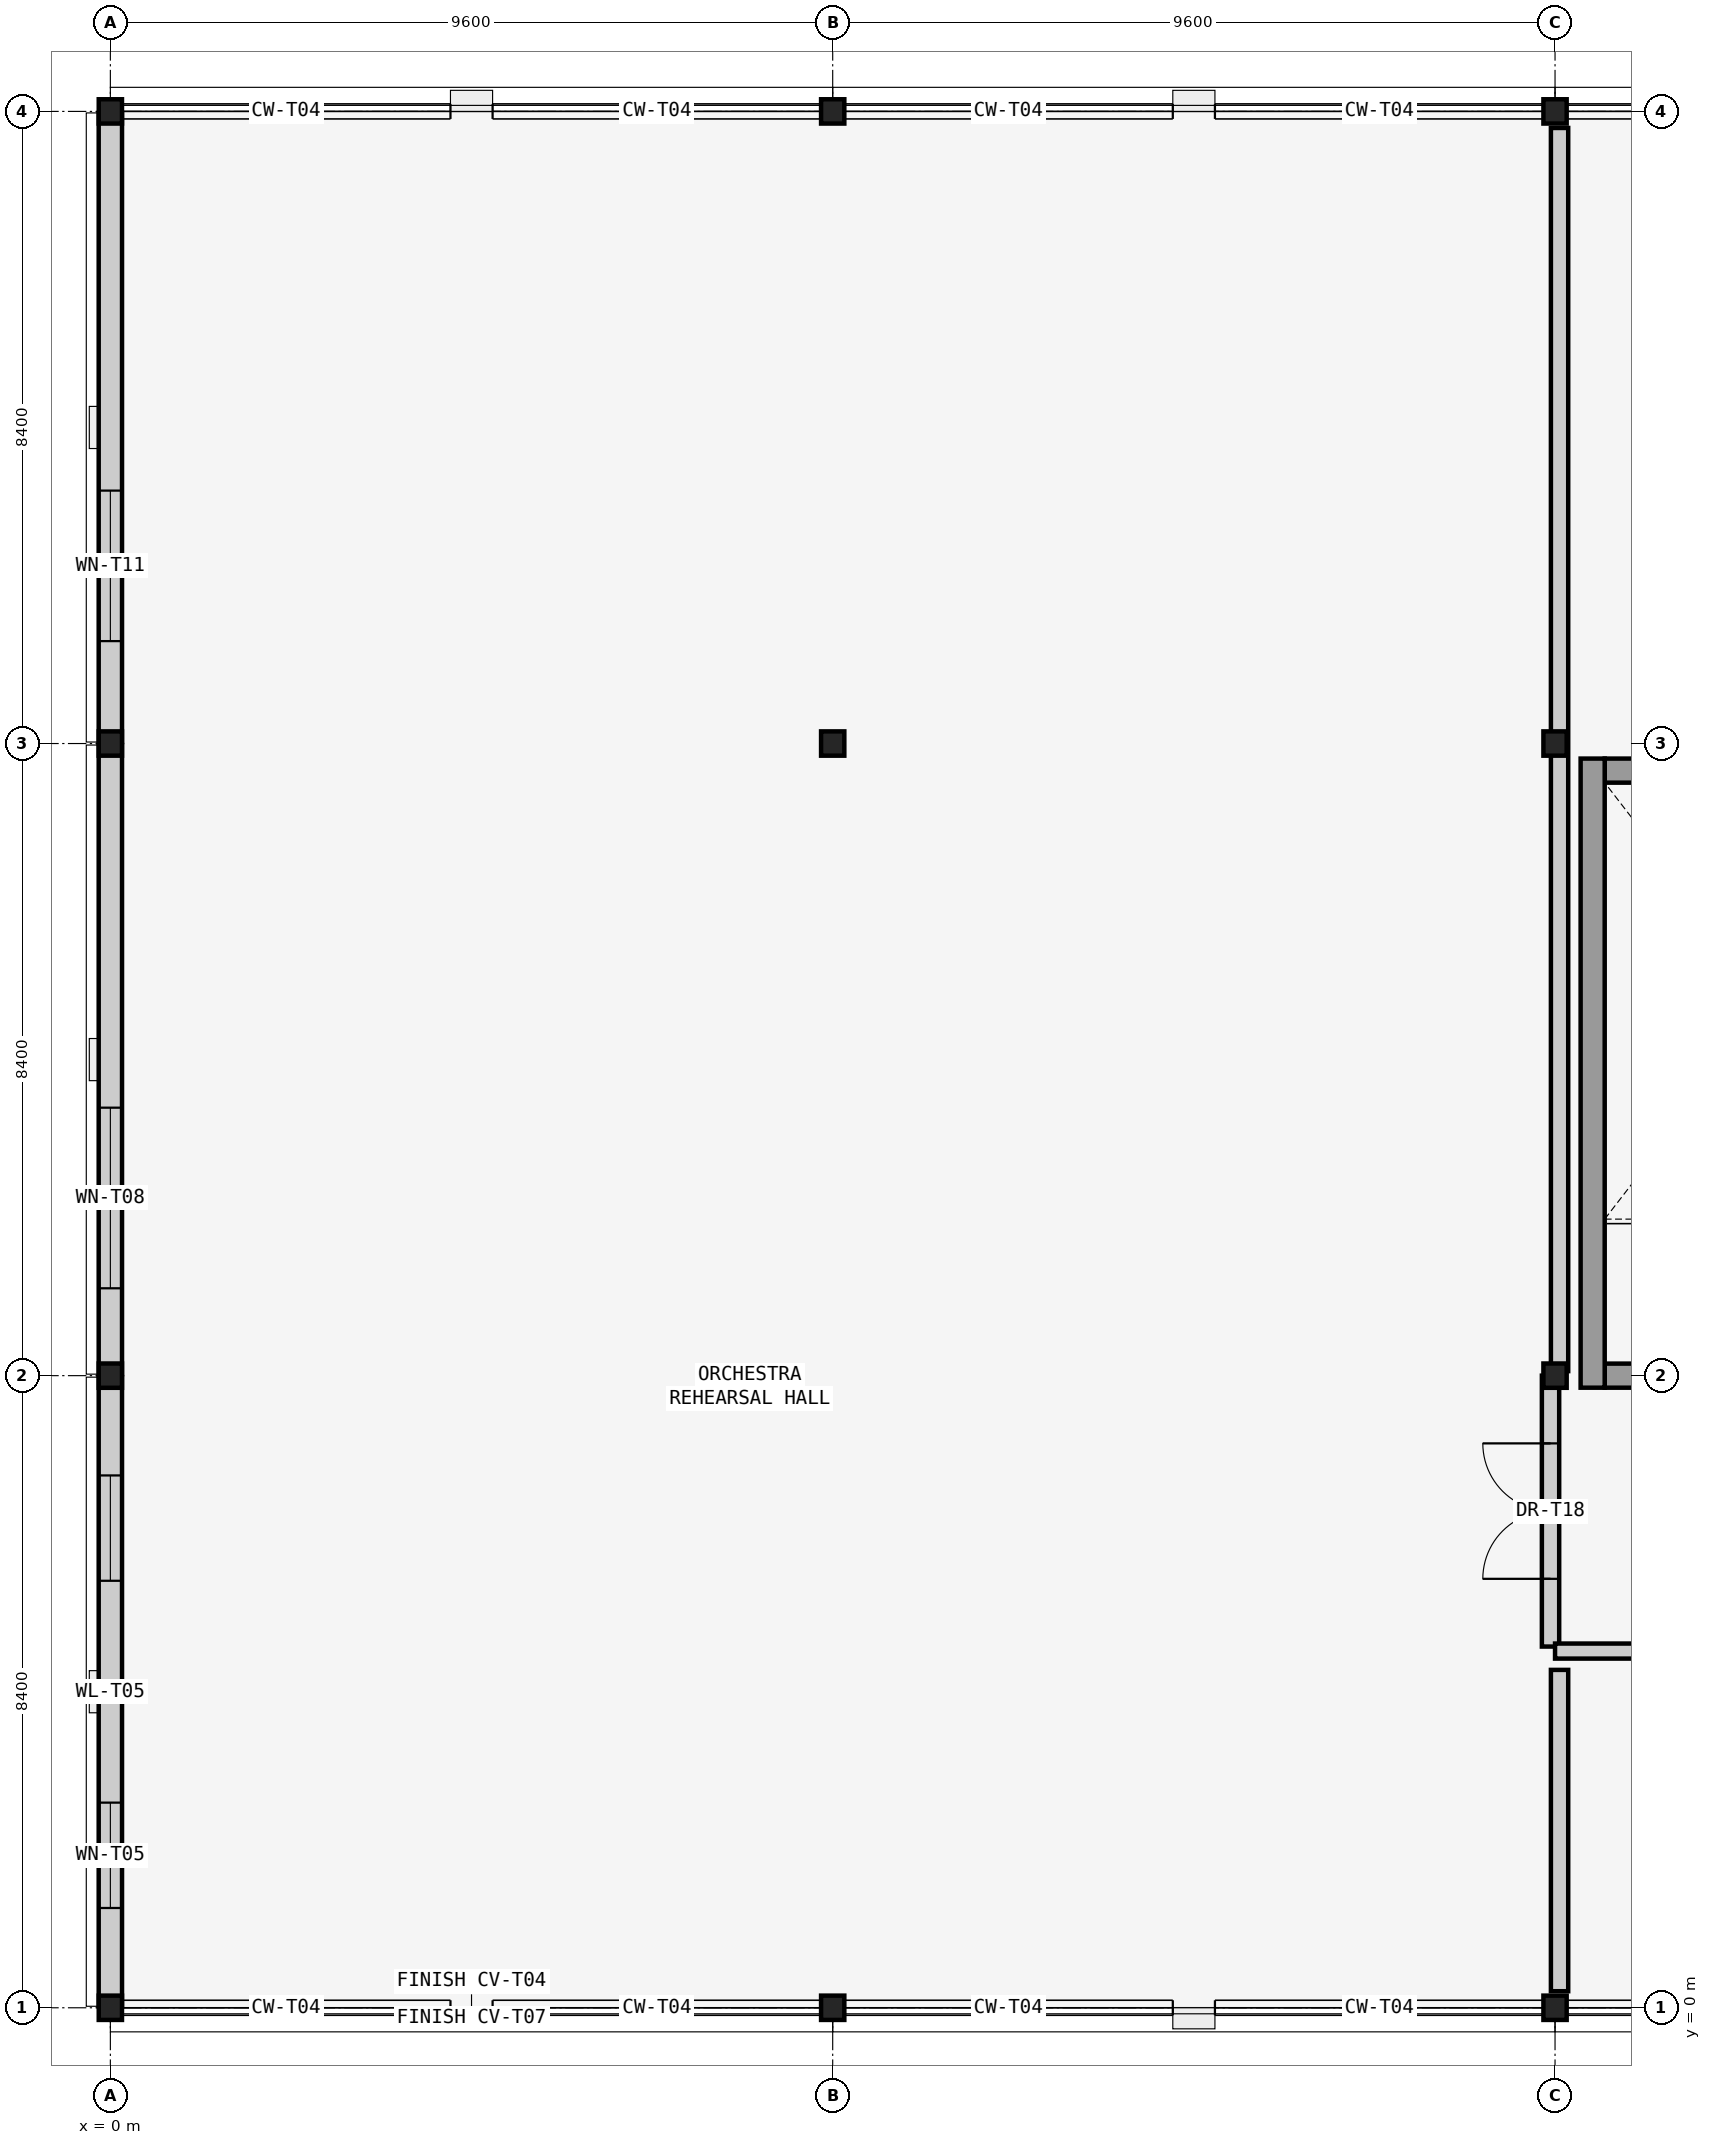
"""IFC4 building model, lengths in metres.
Left out: names, types, materials, properties, quantities, classifications, styles, units other than length and angle.
Written with IfcOpenShell. Run it as: python <this file> out.ifc"""

import sys

from ifc_helpers import new_model, si_unit, direction, frame, frame_2d, origin, origin_2d, place, context, subcontext, project, spatial, rectangle, i_section, extrude, element, fill, save


model = new_model("IFC4")
c1 = context("Model", 3, precision=1e-05, world=origin(), true_north=direction((0.0, 1.0)))
c2 = subcontext(c1, "Body", "Model", "MODEL_VIEW")
j1 = project(units=[si_unit("LENGTHUNIT", "METRE"), si_unit("PLANEANGLEUNIT", "RADIAN")], contexts=[c1])
p1 = place(None, origin())
s1 = spatial("IfcSite", under=j1, at=p1, CompositionType="ELEMENT")
p2 = place(p1, origin())
s2 = spatial("IfcBuilding", under=s1, at=p2, CompositionType="ELEMENT")
p3 = place(p2, frame((0.0, 0.0, 10.2)))
s3 = spatial("IfcBuildingStorey", under=s2, at=p3, CompositionType="ELEMENT", Elevation=10.2)
for number, where, z_axis, x_axis in (
    (1, (0.0, 0.0, 0.0), (0.0, 0.0, 1.0), (1.0, 0.0, 0.0)),
    (2, (0.0, 8.4, 0.0), (0.0, 0.0, 1.0), (1.0, 0.0, 0.0)),
):
    element("IfcColumn", number, at=place(p3, frame(where, z_axis=z_axis, x_axis=x_axis)), inside=s3, PredefinedType="COLUMN", context=c2, shape_type="SweptSolid", body=[
        extrude(i_section(OverallWidth=0.309, OverallDepth=0.323, WebThickness=0.014, FlangeThickness=0.023, at=origin_2d()), origin(), (0.0, 0.0, 1.0), 4.62),
    ])
for number, where, z_axis, x_axis in (
    (3, (0.0, 16.8, 0.0), (0.0, 0.0, 1.0), (1.0, 0.0, 0.0)),
    (4, (0.0, 25.2, 0.0), (0.0, 0.0, 1.0), (1.0, 0.0, 0.0)),
):
    element("IfcColumn", number, at=place(p3, frame(where, z_axis=z_axis, x_axis=x_axis)), inside=s3, PredefinedType="COLUMN", context=c2, shape_type="SweptSolid", body=[
        extrude(i_section(OverallWidth=0.309, OverallDepth=0.323, WebThickness=0.014, FlangeThickness=0.023, at=origin_2d()), origin(), (0.0, 0.0, 1.0), 4.53),
    ])
p4 = place(p3, frame((9.6, 0.0, 0.0), z_axis=(0.0, 0.0, 1.0), x_axis=(1.0, 0.0, 0.0)))
e5 = element("IfcColumn", 5, at=p4, inside=s3, PredefinedType="COLUMN", context=c2, shape_type="SweptSolid", body=[
    extrude(i_section(OverallWidth=0.309, OverallDepth=0.323, WebThickness=0.014, FlangeThickness=0.023, at=origin_2d()), origin(), (0.0, 0.0, 1.0), 4.62),
])
for number, where, z_axis, x_axis in (
    (6, (9.6, 16.8, 0.0), (0.0, 0.0, 1.0), (1.0, 0.0, 0.0)),
    (7, (9.6, 25.2, 0.0), (0.0, 0.0, 1.0), (1.0, 0.0, 0.0)),
):
    element("IfcColumn", number, at=place(p3, frame(where, z_axis=z_axis, x_axis=x_axis)), inside=s3, PredefinedType="COLUMN", context=c2, shape_type="SweptSolid", body=[
        extrude(i_section(OverallWidth=0.309, OverallDepth=0.323, WebThickness=0.014, FlangeThickness=0.023, at=origin_2d()), origin(), (0.0, 0.0, 1.0), 4.53),
    ])
for number, where, z_axis, x_axis in (
    (8, (19.2, 0.0, 0.0), (0.0, 0.0, 1.0), (1.0, 0.0, 0.0)),
    (9, (19.2, 8.4, 0.0), (0.0, 0.0, 1.0), (1.0, 0.0, 0.0)),
):
    element("IfcColumn", number, at=place(p3, frame(where, z_axis=z_axis, x_axis=x_axis)), inside=s3, PredefinedType="COLUMN", context=c2, shape_type="SweptSolid", body=[
        extrude(i_section(OverallWidth=0.309, OverallDepth=0.323, WebThickness=0.014, FlangeThickness=0.023, at=origin_2d()), origin(), (0.0, 0.0, 1.0), 4.62),
    ])
for number, where, z_axis, x_axis in (
    (10, (19.2, 16.8, 0.0), (0.0, 0.0, 1.0), (1.0, 0.0, 0.0)),
    (11, (19.2, 25.2, 0.0), (0.0, 0.0, 1.0), (1.0, 0.0, 0.0)),
):
    element("IfcColumn", number, at=place(p3, frame(where, z_axis=z_axis, x_axis=x_axis)), inside=s3, PredefinedType="COLUMN", context=c2, shape_type="SweptSolid", body=[
        extrude(i_section(OverallWidth=0.309, OverallDepth=0.323, WebThickness=0.014, FlangeThickness=0.023, at=origin_2d()), origin(), (0.0, 0.0, 1.0), 4.53),
    ])
p5 = place(p3, frame((0.0, 0.02, 0.0), z_axis=(0.0, 0.0, 1.0), x_axis=(0.0, 1.0, 0.0)))
e12 = element("IfcWall", 12, at=p5, inside=s3, PredefinedType="SOLIDWALL", context=c2, shape_type="SweptSolid", body=[
    extrude(rectangle(XDim=8.36, YDim=0.31, at=frame_2d((4.18, 0.0))), origin(), (0.0, 0.0, 1.0), 4.54),
])
p6 = place(p5, frame((1.306, 0.0, 1.05)))
e13 = element("IfcOpeningElement", 13, at=p6, cuts=e12, PredefinedType="OPENING", context=c2, shape_type="SweptSolid", body=[
    extrude(rectangle(XDim=1.4, YDim=1.8, at=frame_2d((0.7, 0.9))), frame((0.0, 0.165, 0.0), z_axis=(0.0, -1.0, 0.0), x_axis=(1.0, 0.0, 0.0)), (0.0, 0.0, 1.0), 0.33),
])
p7 = place(p5, frame((5.654, 0.0, 1.05)))
e14 = element("IfcOpeningElement", 14, at=p7, cuts=e12, PredefinedType="OPENING", context=c2, shape_type="SweptSolid", body=[
    extrude(rectangle(XDim=1.4, YDim=1.8, at=frame_2d((0.7, 0.9))), frame((0.0, 0.165, 0.0), z_axis=(0.0, -1.0, 0.0), x_axis=(1.0, 0.0, 0.0)), (0.0, 0.0, 1.0), 0.33),
])
p8 = place(p3, frame((0.0, 8.42, 0.0), z_axis=(0.0, 0.0, 1.0), x_axis=(0.0, 1.0, 0.0)))
e15 = element("IfcWall", 15, at=p8, inside=s3, PredefinedType="SOLIDWALL", context=c2, shape_type="SweptSolid", body=[
    extrude(rectangle(XDim=8.36, YDim=0.31, at=frame_2d((4.18, 0.0))), origin(), (0.0, 0.0, 1.0), 4.54),
])
p9 = place(p8, frame((1.141, 0.0, 0.95)))
e16 = element("IfcOpeningElement", 16, at=p9, cuts=e15, PredefinedType="OPENING", context=c2, shape_type="SweptSolid", body=[
    extrude(rectangle(XDim=2.4, YDim=2.2, at=frame_2d((1.2, 1.1))), frame((0.0, 0.165, 0.0), z_axis=(0.0, -1.0, 0.0), x_axis=(1.0, 0.0, 0.0)), (0.0, 0.0, 1.0), 0.33),
])
p10 = place(p3, frame((0.0, 16.82, 0.0), z_axis=(0.0, 0.0, 1.0), x_axis=(0.0, 1.0, 0.0)))
e17 = element("IfcWall", 17, at=p10, inside=s3, PredefinedType="SOLIDWALL", context=c2, shape_type="SweptSolid", body=[
    extrude(rectangle(XDim=8.36, YDim=0.31, at=frame_2d((4.18, 0.0))), origin(), (0.0, 0.0, 1.0), 4.178),
])
p11 = place(p10, frame((1.341, 0.0, 1.9)))
e18 = element("IfcOpeningElement", 18, at=p11, cuts=e17, PredefinedType="OPENING", context=c2, shape_type="SweptSolid", body=[
    extrude(rectangle(XDim=2.0, YDim=1.5, at=frame_2d((1.0, 0.75))), frame((0.0, 0.165, 0.0), z_axis=(0.0, -1.0, 0.0), x_axis=(1.0, 0.0, 0.0)), (0.0, 0.0, 1.0), 0.33),
])
p12 = place(p3, frame((19.86, 8.4, 0.0), z_axis=(0.0, 0.0, 1.0), x_axis=(1.0, 0.0, 0.0)))
e19 = element("IfcWall", 19, at=p12, inside=s3, PredefinedType="SHEAR", context=c2, shape_type="SweptSolid", body=[
    extrude(rectangle(XDim=4.78, YDim=0.32, at=frame_2d((2.39, 0.0))), origin(), (0.0, 0.0, 1.0), 4.54),
])
p13 = place(p12, frame((1.69, 0.0, 0.0)))
e20 = element("IfcOpeningElement", 20, at=p13, cuts=e19, PredefinedType="OPENING", context=c2, shape_type="SweptSolid", body=[
    extrude(rectangle(XDim=1.1, YDim=2.2, at=frame_2d((0.55, 1.1))), frame((0.0, 0.17, 0.0), z_axis=(0.0, -1.0, 0.0), x_axis=(1.0, 0.0, 0.0)), (0.0, 0.0, 1.0), 0.34),
])
p14 = place(p3, frame((28.14, 16.44, 0.0), z_axis=(0.0, 0.0, 1.0), x_axis=(-1.0, 0.0, 0.0)))
e21 = element("IfcWall", 21, at=p14, inside=s3, PredefinedType="SHEAR", context=c2, shape_type="SweptSolid", body=[
    extrude(rectangle(XDim=8.28, YDim=0.32, at=frame_2d((4.14, 0.0))), origin(), (0.0, 0.0, 1.0), 4.54),
])
p15 = place(p3, frame((19.7, 16.6, 0.0), z_axis=(0.0, 0.0, 1.0), x_axis=(0.0, -1.0, 0.0)))
e22 = element("IfcWall", 22, at=p15, inside=s3, PredefinedType="SHEAR", context=c2, shape_type="SweptSolid", body=[
    extrude(rectangle(XDim=8.36, YDim=0.32, at=frame_2d((4.18, 0.0))), origin(), (0.0, 0.0, 1.0), 4.54),
])
p16 = place(p3, frame((19.14, 4.8, 0.0), z_axis=(0.0, 0.0, 1.0), x_axis=(0.0, 1.0, 0.0)))
e23 = element("IfcWall", 23, at=p16, inside=s3, PredefinedType="SOLIDWALL", context=c2, shape_type="SweptSolid", body=[
    extrude(rectangle(XDim=3.6, YDim=0.23, at=frame_2d((1.8, 0.0))), origin(), (0.0, 0.0, 1.0), 4.3),
])
p17 = place(p16, frame((0.9, 0.0, 0.0)))
e24 = element("IfcOpeningElement", 24, at=p17, cuts=e23, PredefinedType="OPENING", context=c2, shape_type="SweptSolid", body=[
    extrude(rectangle(XDim=1.8, YDim=2.4, at=frame_2d((0.9, 1.2))), frame((0.0, 0.125, 0.0), z_axis=(0.0, -1.0, 0.0), x_axis=(1.0, 0.0, 0.0)), (0.0, 0.0, 1.0), 0.25),
])
p18 = place(p3, frame((19.2, 4.74, 0.0), z_axis=(0.0, 0.0, 1.0), x_axis=(1.0, 0.0, 0.0)))
e25 = element("IfcWall", 25, at=p18, inside=s3, PredefinedType="SOLIDWALL", context=c2, shape_type="SweptSolid", body=[
    extrude(rectangle(XDim=18.95, YDim=0.2, at=frame_2d((9.475, 0.0))), origin(), (0.0, 0.0, 1.0), 4.3),
])
p19 = place(p18, frame((9.0, 0.0, 0.0)))
e26 = element("IfcOpeningElement", 26, at=p19, cuts=e25, PredefinedType="OPENING", context=c2, shape_type="SweptSolid", body=[
    extrude(rectangle(XDim=0.95, YDim=2.15, at=frame_2d((0.475, 1.075))), frame((0.0, 0.11, 0.0), z_axis=(0.0, -1.0, 0.0), x_axis=(1.0, 0.0, 0.0)), (0.0, 0.0, 1.0), 0.22),
])
p20 = place(p3, frame((19.26, 8.46, 0.0), z_axis=(0.0, 0.0, 1.0), x_axis=(0.0, 1.0, 0.0)))
e27 = element("IfcWall", 27, at=p20, inside=s3, PredefinedType="SOLIDWALL", context=c2, shape_type="SweptSolid", body=[
    extrude(rectangle(XDim=16.52, YDim=0.23, at=frame_2d((8.26, 0.0))), origin(), (0.0, 0.0, 1.0), 3.807),
])
p21 = place(p3, frame((19.26, 0.22, 0.0), z_axis=(0.0, 0.0, 1.0), x_axis=(0.0, 1.0, 0.0)))
e28 = element("IfcWall", 28, at=p21, inside=s3, PredefinedType="SOLIDWALL", context=c2, shape_type="SweptSolid", body=[
    extrude(rectangle(XDim=4.27, YDim=0.23, at=frame_2d((2.135, 0.0))), origin(), (0.0, 0.0, 1.0), 4.3),
])
p22 = place(p6, origin())
e29 = element("IfcWindow", 29, at=p22, inside=s3, PartitioningType="SINGLE_PANEL", PredefinedType="WINDOW", context=c2, shape_type="SweptSolid", body=[
    extrude(rectangle(XDim=1.4, YDim=1.8, at=frame_2d((0.7, 0.9))), frame((0.0, 0.03, 0.0), z_axis=(0.0, -1.0, 0.0), x_axis=(1.0, 0.0, 0.0)), (0.0, 0.0, 1.0), 0.06),
])
fill(e13, e29)
p23 = place(p7, origin())
e30 = element("IfcWindow", 30, at=p23, inside=s3, PartitioningType="SINGLE_PANEL", PredefinedType="WINDOW", context=c2, shape_type="SweptSolid", body=[
    extrude(rectangle(XDim=1.4, YDim=1.8, at=frame_2d((0.7, 0.9))), frame((0.0, 0.03, 0.0), z_axis=(0.0, -1.0, 0.0), x_axis=(1.0, 0.0, 0.0)), (0.0, 0.0, 1.0), 0.06),
])
fill(e14, e30)
p24 = place(p9, origin())
e31 = element("IfcWindow", 31, at=p24, inside=s3, PartitioningType="SINGLE_PANEL", PredefinedType="WINDOW", context=c2, shape_type="SweptSolid", body=[
    extrude(rectangle(XDim=2.4, YDim=2.2, at=frame_2d((1.2, 1.1))), frame((0.0, 0.03, 0.0), z_axis=(0.0, -1.0, 0.0), x_axis=(1.0, 0.0, 0.0)), (0.0, 0.0, 1.0), 0.06),
])
fill(e16, e31)
p25 = place(p11, origin())
e32 = element("IfcWindow", 32, at=p25, inside=s3, PartitioningType="SINGLE_PANEL", PredefinedType="WINDOW", context=c2, shape_type="SweptSolid", body=[
    extrude(rectangle(XDim=2.0, YDim=1.5, at=frame_2d((1.0, 0.75))), frame((0.0, 0.03, 0.0), z_axis=(0.0, -1.0, 0.0), x_axis=(1.0, 0.0, 0.0)), (0.0, 0.0, 1.0), 0.06),
])
fill(e18, e32)
p26 = place(p17, origin())
e33 = element("IfcDoor", 33, at=p26, inside=s3, OperationType="DOUBLE_SWING_LEFT", PredefinedType="DOOR", context=c2, shape_type="SweptSolid", body=[
    extrude(rectangle(XDim=1.8, YDim=2.4, at=frame_2d((0.9, 1.2))), frame((0.0, 0.025, 0.0), z_axis=(0.0, -1.0, 0.0), x_axis=(1.0, 0.0, 0.0)), (0.0, 0.0, 1.0), 0.05),
])
fill(e24, e33)
save(model, sys.argv[1])
